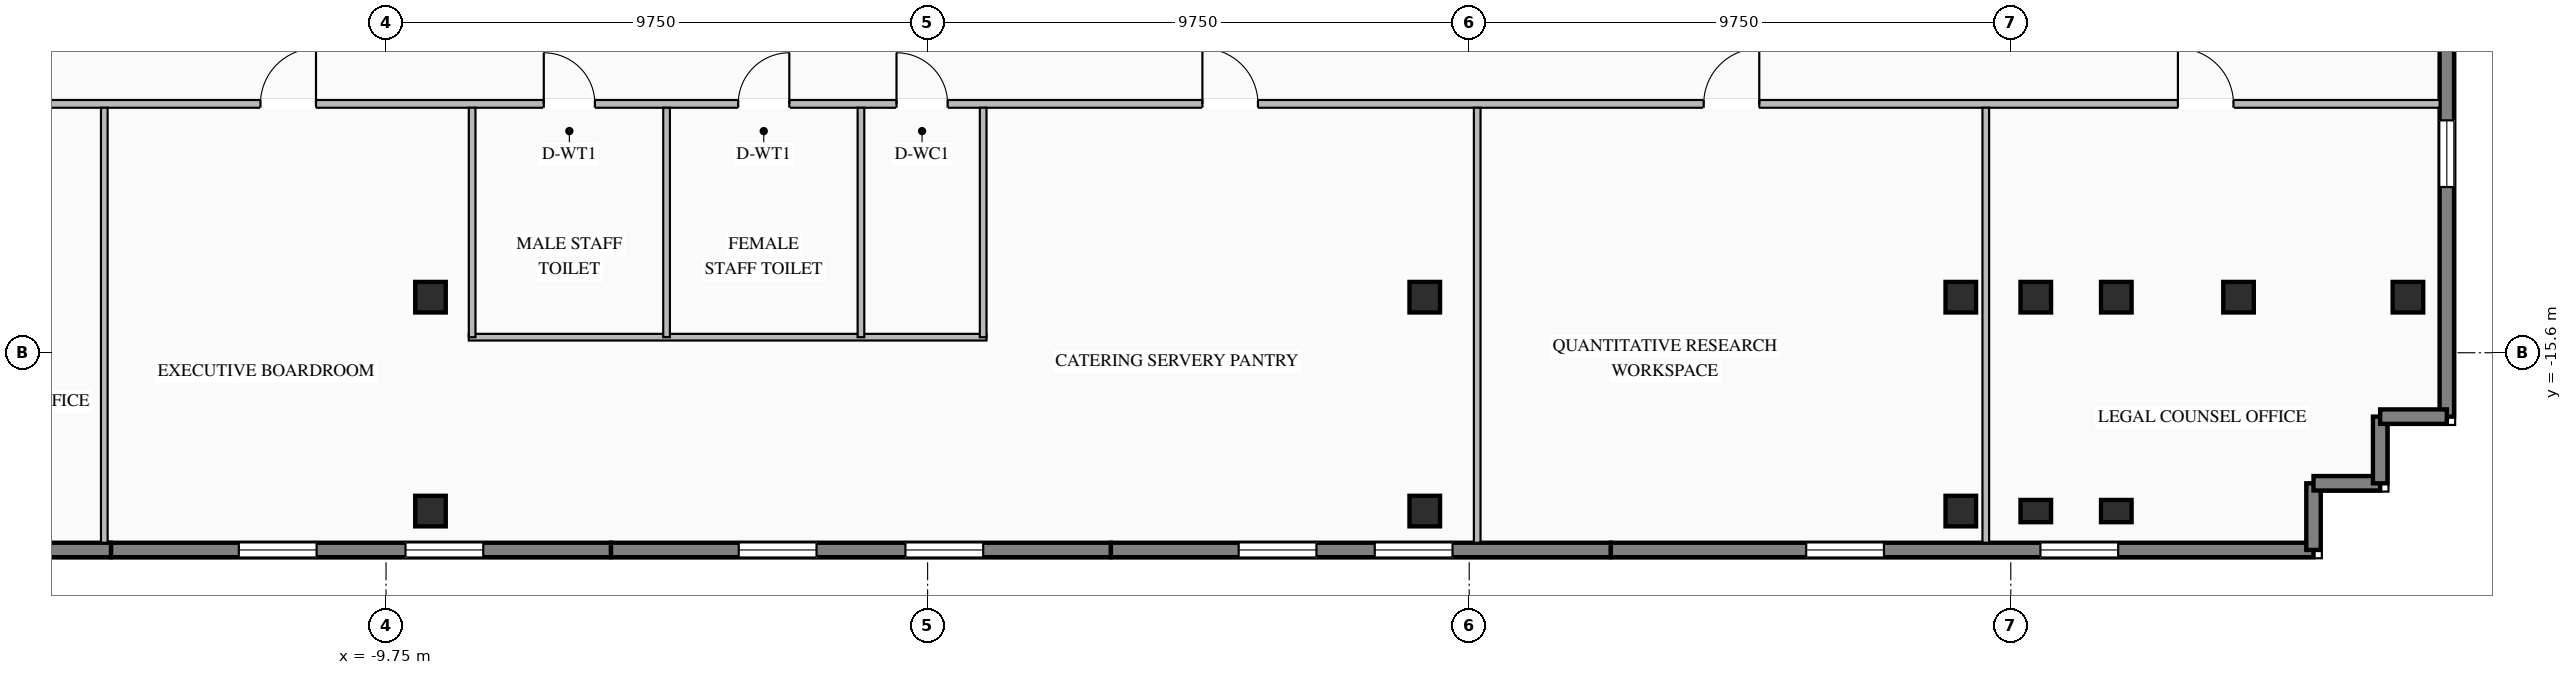
"""IFC4 building model, lengths in metres.
Left out: names, types, materials, properties, quantities, classifications, styles, units other than length and angle.
Written with IfcOpenShell. Run it as: python <this file> out.ifc"""

import sys

from ifc_helpers import new_model, si_unit, direction, frame, frame_2d, origin, origin_2d, place, context, subcontext, project, spatial, rectangle, i_section, extrude, element, fill, save


model = new_model("IFC4")
c1 = context("Model", 3, precision=1e-05, world=origin(), true_north=direction((0.0, 1.0)))
c2 = subcontext(c1, "Body", "Model", "MODEL_VIEW")
j1 = project(units=[si_unit("LENGTHUNIT", "METRE"), si_unit("PLANEANGLEUNIT", "RADIAN")], contexts=[c1])
p1 = place(None, origin())
s1 = spatial("IfcSite", under=j1, at=p1, CompositionType="ELEMENT")
p2 = place(p1, origin())
s2 = spatial("IfcBuilding", under=s1, at=p2, CompositionType="ELEMENT")
p3 = place(p2, frame((0.0, 0.0, 229.2)))
s3 = spatial("IfcBuildingStorey", under=s2, at=p3, CompositionType="ELEMENT", Elevation=229.2)
for number, where, z_axis, x_axis in (
    (1, (-8.95, -14.6, 0.0), (0.0, 0.0, 1.0), (1.0, 0.0, 0.0)),
    (2, (8.95, -14.6, 0.0), (0.0, 0.0, 1.0), (1.0, 0.0, 0.0)),
    (3, (18.6, -14.6, 0.0), (0.0, 0.0, 1.0), (1.0, 0.0, 0.0)),
    (4, (19.95, -14.6, 0.0), (0.0, 0.0, 1.0), (1.0, 0.0, 0.0)),
    (5, (21.4, -14.6, 0.0), (0.0, 0.0, 1.0), (1.0, 0.0, 0.0)),
    (6, (23.6, -14.6, 0.0), (0.0, 0.0, 1.0), (1.0, 0.0, 0.0)),
    (7, (-8.95, -18.45, 0.0), (0.0, 0.0, 1.0), (1.0, 0.0, 0.0)),
    (8, (8.95, -18.45, 0.0), (0.0, 0.0, 1.0), (1.0, 0.0, 0.0)),
    (9, (18.6, -18.45, 0.0), (0.0, 0.0, 1.0), (1.0, 0.0, 0.0)),
    (10, (26.65, -14.6, 0.0), (0.0, 0.0, 1.0), (1.0, 0.0, 0.0)),
):
    element("IfcColumn", number, at=place(p3, frame(where, z_axis=z_axis, x_axis=x_axis)), inside=s3, PredefinedType="COLUMN", context=c2, shape_type="SweptSolid", body=[
        extrude(i_section(OverallWidth=0.55, OverallDepth=0.55, WebThickness=0.024, FlangeThickness=0.036, at=origin_2d()), origin(), (0.0, 0.0, 1.0), 3.45),
    ])
for number, where, z_axis, x_axis in (
    (11, (19.95, -18.45, 0.0), (0.0, 0.0, 1.0), (1.0, 0.0, 0.0)),
    (12, (21.4, -18.45, 0.0), (0.0, 0.0, 1.0), (1.0, 0.0, 0.0)),
):
    element("IfcColumn", number, at=place(p3, frame(where, z_axis=z_axis, x_axis=x_axis)), inside=s3, PredefinedType="PILASTER", context=c2, shape_type="SweptSolid", body=[
        extrude(rectangle(XDim=0.55, YDim=0.4, at=origin_2d()), origin(), (0.0, 0.0, 1.0), 3.45),
    ])
p4 = place(p3, frame((-14.7, -19.15, 0.0), z_axis=(0.0, 0.0, 1.0), x_axis=(-1.0, 0.0, 0.0)))
e13 = element("IfcWall", 13, at=p4, inside=s3, PredefinedType="STANDARD", context=c2, shape_type="SweptSolid", body=[
    extrude(rectangle(XDim=12.65, YDim=0.26, at=frame_2d((6.325, 0.0))), origin(), (0.0, 0.0, 1.0), 3.25),
])
p5 = place(p4, frame((3.517, 0.0, 0.76)))
e14 = element("IfcOpeningElement", 14, at=p5, cuts=e13, PredefinedType="OPENING", context=c2, shape_type="SweptSolid", body=[
    extrude(rectangle(XDim=1.4, YDim=1.95, at=frame_2d((0.7, 0.975))), frame((0.0, 0.14, 0.0), z_axis=(0.0, -1.0, 0.0), x_axis=(1.0, 0.0, 0.0)), (0.0, 0.0, 1.0), 0.28),
])
p6 = place(p4, frame((8.283, 0.0, 0.76)))
e15 = element("IfcOpeningElement", 15, at=p6, cuts=e13, PredefinedType="OPENING", context=c2, shape_type="SweptSolid", body=[
    extrude(rectangle(XDim=1.4, YDim=1.95, at=frame_2d((0.7, 0.975))), frame((0.0, 0.14, 0.0), z_axis=(0.0, -1.0, 0.0), x_axis=(1.0, 0.0, 0.0)), (0.0, 0.0, 1.0), 0.28),
])
p7 = place(p3, frame((-5.7, -19.15, 0.0), z_axis=(0.0, 0.0, 1.0), x_axis=(-1.0, 0.0, 0.0)))
e16 = element("IfcWall", 16, at=p7, inside=s3, PredefinedType="STANDARD", context=c2, shape_type="SweptSolid", body=[
    extrude(rectangle(XDim=9.0, YDim=0.26, at=frame_2d((4.5, 0.0))), origin(), (0.0, 0.0, 1.0), 3.25),
])
p8 = place(p7, frame((2.3, 0.0, 0.76)))
e17 = element("IfcOpeningElement", 17, at=p8, cuts=e16, PredefinedType="OPENING", context=c2, shape_type="SweptSolid", body=[
    extrude(rectangle(XDim=1.4, YDim=1.95, at=frame_2d((0.7, 0.975))), frame((0.0, 0.14, 0.0), z_axis=(0.0, -1.0, 0.0), x_axis=(1.0, 0.0, 0.0)), (0.0, 0.0, 1.0), 0.28),
])
p9 = place(p7, frame((5.3, 0.0, 0.76)))
e18 = element("IfcOpeningElement", 18, at=p9, cuts=e16, PredefinedType="OPENING", context=c2, shape_type="SweptSolid", body=[
    extrude(rectangle(XDim=1.4, YDim=1.95, at=frame_2d((0.7, 0.975))), frame((0.0, 0.14, 0.0), z_axis=(0.0, -1.0, 0.0), x_axis=(1.0, 0.0, 0.0)), (0.0, 0.0, 1.0), 0.28),
])
p10 = place(p3, frame((3.3, -19.15, 0.0), z_axis=(0.0, 0.0, 1.0), x_axis=(-1.0, 0.0, 0.0)))
e19 = element("IfcWall", 19, at=p10, inside=s3, PredefinedType="STANDARD", context=c2, shape_type="SweptSolid", body=[
    extrude(rectangle(XDim=9.0, YDim=0.26, at=frame_2d((4.5, 0.0))), origin(), (0.0, 0.0, 1.0), 3.25),
])
p11 = place(p10, frame((2.3, 0.0, 0.76)))
e20 = element("IfcOpeningElement", 20, at=p11, cuts=e19, PredefinedType="OPENING", context=c2, shape_type="SweptSolid", body=[
    extrude(rectangle(XDim=1.4, YDim=1.95, at=frame_2d((0.7, 0.975))), frame((0.0, 0.14, 0.0), z_axis=(0.0, -1.0, 0.0), x_axis=(1.0, 0.0, 0.0)), (0.0, 0.0, 1.0), 0.28),
])
p12 = place(p10, frame((5.3, 0.0, 0.76)))
e21 = element("IfcOpeningElement", 21, at=p12, cuts=e19, PredefinedType="OPENING", context=c2, shape_type="SweptSolid", body=[
    extrude(rectangle(XDim=1.4, YDim=1.95, at=frame_2d((0.7, 0.975))), frame((0.0, 0.14, 0.0), z_axis=(0.0, -1.0, 0.0), x_axis=(1.0, 0.0, 0.0)), (0.0, 0.0, 1.0), 0.28),
])
p13 = place(p3, frame((12.3, -19.15, 0.0), z_axis=(0.0, 0.0, 1.0), x_axis=(-1.0, 0.0, 0.0)))
e22 = element("IfcWall", 22, at=p13, inside=s3, PredefinedType="STANDARD", context=c2, shape_type="SweptSolid", body=[
    extrude(rectangle(XDim=9.0, YDim=0.26, at=frame_2d((4.5, 0.0))), origin(), (0.0, 0.0, 1.0), 3.25),
])
p14 = place(p13, frame((2.85, 0.0, 0.76)))
e23 = element("IfcOpeningElement", 23, at=p14, cuts=e22, PredefinedType="OPENING", context=c2, shape_type="SweptSolid", body=[
    extrude(rectangle(XDim=1.4, YDim=1.95, at=frame_2d((0.7, 0.975))), frame((0.0, 0.14, 0.0), z_axis=(0.0, -1.0, 0.0), x_axis=(1.0, 0.0, 0.0)), (0.0, 0.0, 1.0), 0.28),
])
p15 = place(p13, frame((5.3, 0.0, 0.76)))
e24 = element("IfcOpeningElement", 24, at=p15, cuts=e22, PredefinedType="OPENING", context=c2, shape_type="SweptSolid", body=[
    extrude(rectangle(XDim=1.4, YDim=1.95, at=frame_2d((0.7, 0.975))), frame((0.0, 0.14, 0.0), z_axis=(0.0, -1.0, 0.0), x_axis=(1.0, 0.0, 0.0)), (0.0, 0.0, 1.0), 0.28),
])
p16 = place(p3, frame((24.95, -19.15, 0.0), z_axis=(0.0, 0.0, 1.0), x_axis=(-1.0, 0.0, 0.0)))
e25 = element("IfcWall", 25, at=p16, inside=s3, PredefinedType="STANDARD", context=c2, shape_type="SweptSolid", body=[
    extrude(rectangle(XDim=12.65, YDim=0.26, at=frame_2d((6.325, 0.0))), origin(), (0.0, 0.0, 1.0), 3.25),
])
p17 = place(p16, frame((3.517, 0.0, 0.76)))
e26 = element("IfcOpeningElement", 26, at=p17, cuts=e25, PredefinedType="OPENING", context=c2, shape_type="SweptSolid", body=[
    extrude(rectangle(XDim=1.4, YDim=1.95, at=frame_2d((0.7, 0.975))), frame((0.0, 0.14, 0.0), z_axis=(0.0, -1.0, 0.0), x_axis=(1.0, 0.0, 0.0)), (0.0, 0.0, 1.0), 0.28),
])
p18 = place(p16, frame((7.733, 0.0, 0.76)))
e27 = element("IfcOpeningElement", 27, at=p18, cuts=e25, PredefinedType="OPENING", context=c2, shape_type="SweptSolid", body=[
    extrude(rectangle(XDim=1.4, YDim=1.95, at=frame_2d((0.7, 0.975))), frame((0.0, 0.14, 0.0), z_axis=(0.0, -1.0, 0.0), x_axis=(1.0, 0.0, 0.0)), (0.0, 0.0, 1.0), 0.28),
])
p19 = place(p3, frame((27.35, -0.9, 0.0), z_axis=(0.0, 0.0, 1.0), x_axis=(0.0, -1.0, 0.0)))
e28 = element("IfcWall", 28, at=p19, inside=s3, PredefinedType="STANDARD", context=c2, shape_type="SweptSolid", body=[
    extrude(rectangle(XDim=15.85, YDim=0.26, at=frame_2d((7.925, 0.0))), origin(), (0.0, 0.0, 1.0), 3.25),
])
p20 = place(p19, frame((4.683, 0.0, 0.76)))
e29 = element("IfcOpeningElement", 29, at=p20, cuts=e28, PredefinedType="OPENING", context=c2, shape_type="SweptSolid", body=[
    extrude(rectangle(XDim=1.2, YDim=1.95, at=frame_2d((0.6, 0.975))), frame((0.0, 0.14, 0.0), z_axis=(0.0, -1.0, 0.0), x_axis=(1.0, 0.0, 0.0)), (0.0, 0.0, 1.0), 0.28),
])
p21 = place(p19, frame((10.517, 0.0, 0.76)))
e30 = element("IfcOpeningElement", 30, at=p21, cuts=e28, PredefinedType="OPENING", context=c2, shape_type="SweptSolid", body=[
    extrude(rectangle(XDim=1.2, YDim=1.95, at=frame_2d((0.6, 0.975))), frame((0.0, 0.14, 0.0), z_axis=(0.0, -1.0, 0.0), x_axis=(1.0, 0.0, 0.0)), (0.0, 0.0, 1.0), 0.28),
])
for number, where, z_axis, x_axis in (
    (31, (24.95, -19.15, 0.0), (0.0, 0.0, 1.0), (0.0, 1.0, 0.0)),
    (32, (24.95, -17.95, 0.0), (0.0, 0.0, 1.0), (1.0, 0.0, 0.0)),
    (33, (26.15, -17.95, 0.0), (0.0, 0.0, 1.0), (0.0, 1.0, 0.0)),
):
    element("IfcWall", number, at=place(p3, frame(where, z_axis=z_axis, x_axis=x_axis)), inside=s3, PredefinedType="STANDARD", context=c2, shape_type="SweptSolid", body=[
        extrude(rectangle(XDim=1.2, YDim=0.26, at=frame_2d((0.6, 0.0))), origin(), (0.0, 0.0, 1.0), 3.25),
    ])
p22 = place(p3, frame((26.15, -16.75, 0.0), z_axis=(0.0, 0.0, 1.0), x_axis=(1.0, 0.0, 0.0)))
e34 = element("IfcWall", 34, at=p22, inside=s3, PredefinedType="STANDARD", context=c2, shape_type="SweptSolid", body=[
    extrude(rectangle(XDim=1.2, YDim=0.26, at=frame_2d((0.6, 0.0))), origin(), (0.0, 0.0, 1.0), 3.25),
])
p23 = place(p3, frame((-29.62, -11.12, 0.0), z_axis=(0.0, 0.0, 1.0), x_axis=(1.0, 0.0, 0.0)))
e35 = element("IfcWall", 35, at=p23, inside=s3, PredefinedType="STANDARD", context=c2, shape_type="SweptSolid", body=[
    extrude(rectangle(XDim=56.84, YDim=0.14, at=frame_2d((28.42, 0.0))), origin(), (0.0, 0.0, 1.0), 3.25),
])
p24 = place(p23, frame((22.71, 0.0, 0.0)))
e36 = element("IfcOpeningElement", 36, at=p24, cuts=e35, PredefinedType="OPENING", context=c2, shape_type="SweptSolid", body=[
    extrude(rectangle(XDim=0.92, YDim=2.08, at=frame_2d((0.46, 1.04))), frame((0.0, 0.08, 0.0), z_axis=(0.0, -1.0, 0.0), x_axis=(1.0, 0.0, 0.0)), (0.0, 0.0, 1.0), 0.16),
])
p25 = place(p23, frame((26.21, 0.0, 0.0)))
e37 = element("IfcOpeningElement", 37, at=p25, cuts=e35, PredefinedType="OPENING", context=c2, shape_type="SweptSolid", body=[
    extrude(rectangle(XDim=0.92, YDim=2.08, at=frame_2d((0.46, 1.04))), frame((0.0, 0.08, 0.0), z_axis=(0.0, -1.0, 0.0), x_axis=(1.0, 0.0, 0.0)), (0.0, 0.0, 1.0), 0.16),
])
p26 = place(p23, frame((29.06, 0.0, 0.0)))
e38 = element("IfcOpeningElement", 38, at=p26, cuts=e35, PredefinedType="OPENING", context=c2, shape_type="SweptSolid", body=[
    extrude(rectangle(XDim=0.92, YDim=2.08, at=frame_2d((0.46, 1.04))), frame((0.0, 0.08, 0.0), z_axis=(0.0, -1.0, 0.0), x_axis=(1.0, 0.0, 0.0)), (0.0, 0.0, 1.0), 0.16),
])
p27 = place(p23, frame((3.287, 0.0, 0.0)))
e39 = element("IfcOpeningElement", 39, at=p27, cuts=e35, PredefinedType="OPENING", context=c2, shape_type="SweptSolid", body=[
    extrude(rectangle(XDim=1.0, YDim=2.08, at=frame_2d((0.5, 1.04))), frame((0.0, 0.08, 0.0), z_axis=(0.0, -1.0, 0.0), x_axis=(1.0, 0.0, 0.0)), (0.0, 0.0, 1.0), 0.16),
])
p28 = place(p23, frame((10.56, 0.0, 0.0)))
e40 = element("IfcOpeningElement", 40, at=p28, cuts=e35, PredefinedType="OPENING", context=c2, shape_type="SweptSolid", body=[
    extrude(rectangle(XDim=1.0, YDim=2.08, at=frame_2d((0.5, 1.04))), frame((0.0, 0.08, 0.0), z_axis=(0.0, -1.0, 0.0), x_axis=(1.0, 0.0, 0.0)), (0.0, 0.0, 1.0), 0.16),
])
p29 = place(p23, frame((17.609, 0.0, 0.0)))
e41 = element("IfcOpeningElement", 41, at=p29, cuts=e35, PredefinedType="OPENING", context=c2, shape_type="SweptSolid", body=[
    extrude(rectangle(XDim=1.0, YDim=2.08, at=frame_2d((0.5, 1.04))), frame((0.0, 0.08, 0.0), z_axis=(0.0, -1.0, 0.0), x_axis=(1.0, 0.0, 0.0)), (0.0, 0.0, 1.0), 0.16),
])
p30 = place(p23, frame((34.567, 0.0, 0.0)))
e42 = element("IfcOpeningElement", 42, at=p30, cuts=e35, PredefinedType="OPENING", context=c2, shape_type="SweptSolid", body=[
    extrude(rectangle(XDim=1.0, YDim=2.08, at=frame_2d((0.5, 1.04))), frame((0.0, 0.08, 0.0), z_axis=(0.0, -1.0, 0.0), x_axis=(1.0, 0.0, 0.0)), (0.0, 0.0, 1.0), 0.16),
])
p31 = place(p23, frame((43.592, 0.0, 0.0)))
e43 = element("IfcOpeningElement", 43, at=p31, cuts=e35, PredefinedType="OPENING", context=c2, shape_type="SweptSolid", body=[
    extrude(rectangle(XDim=1.0, YDim=2.08, at=frame_2d((0.5, 1.04))), frame((0.0, 0.08, 0.0), z_axis=(0.0, -1.0, 0.0), x_axis=(1.0, 0.0, 0.0)), (0.0, 0.0, 1.0), 0.16),
])
p32 = place(p23, frame((52.129, 0.0, 0.0)))
e44 = element("IfcOpeningElement", 44, at=p32, cuts=e35, PredefinedType="OPENING", context=c2, shape_type="SweptSolid", body=[
    extrude(rectangle(XDim=1.0, YDim=2.08, at=frame_2d((0.5, 1.04))), frame((0.0, 0.08, 0.0), z_axis=(0.0, -1.0, 0.0), x_axis=(1.0, 0.0, 0.0)), (0.0, 0.0, 1.0), 0.16),
])
p33 = place(p3, frame((-8.26, -15.32, 0.0), z_axis=(0.0, 0.0, 1.0), x_axis=(1.0, 0.0, 0.0)))
e45 = element("IfcWall", 45, at=p33, inside=s3, PredefinedType="STANDARD", context=c2, shape_type="SweptSolid", body=[
    extrude(rectangle(XDim=9.32, YDim=0.12, at=frame_2d((4.66, 0.0))), origin(), (0.0, 0.0, 1.0), 3.25),
])
for number, where, z_axis, x_axis in (
    (46, (-8.2, -15.32, 0.0), (0.0, 0.0, 1.0), (0.0, 1.0, 0.0)),
    (47, (-4.7, -15.32, 0.0), (0.0, 0.0, 1.0), (0.0, 1.0, 0.0)),
    (48, (-1.2, -15.32, 0.0), (0.0, 0.0, 1.0), (0.0, 1.0, 0.0)),
    (49, (1.0, -15.32, 0.0), (0.0, 0.0, 1.0), (0.0, 1.0, 0.0)),
):
    element("IfcWall", number, at=place(p3, frame(where, z_axis=z_axis, x_axis=x_axis)), inside=s3, PredefinedType="STANDARD", context=c2, shape_type="SweptSolid", body=[
        extrude(rectangle(XDim=4.13, YDim=0.12, at=frame_2d((2.065, 0.0))), origin(), (0.0, 0.0, 1.0), 3.25),
    ])
for number, where, z_axis, x_axis in (
    (50, (-14.822, -19.02, 0.0), (0.0, 0.0, 1.0), (0.0, 1.0, 0.0)),
    (51, (9.894, -19.02, 0.0), (0.0, 0.0, 1.0), (0.0, 1.0, 0.0)),
    (52, (19.05, -19.02, 0.0), (0.0, 0.0, 1.0), (0.0, 1.0, 0.0)),
):
    element("IfcWall", number, at=place(p3, frame(where, z_axis=z_axis, x_axis=x_axis)), inside=s3, PredefinedType="STANDARD", context=c2, shape_type="SweptSolid", body=[
        extrude(rectangle(XDim=7.83, YDim=0.12, at=frame_2d((3.915, 0.0))), origin(), (0.0, 0.0, 1.0), 3.25),
    ])
p34 = place(p8, origin())
e53 = element("IfcWindow", 53, at=p34, inside=s3, PartitioningType="SINGLE_PANEL", PredefinedType="WINDOW", context=c2, shape_type="SweptSolid", body=[
    extrude(rectangle(XDim=1.4, YDim=1.95, at=frame_2d((0.7, 0.975))), frame((0.0, 0.03, 0.0), z_axis=(0.0, -1.0, 0.0), x_axis=(1.0, 0.0, 0.0)), (0.0, 0.0, 1.0), 0.06),
])
fill(e17, e53)
p35 = place(p9, origin())
e54 = element("IfcWindow", 54, at=p35, inside=s3, PartitioningType="SINGLE_PANEL", PredefinedType="WINDOW", context=c2, shape_type="SweptSolid", body=[
    extrude(rectangle(XDim=1.4, YDim=1.95, at=frame_2d((0.7, 0.975))), frame((0.0, 0.03, 0.0), z_axis=(0.0, -1.0, 0.0), x_axis=(1.0, 0.0, 0.0)), (0.0, 0.0, 1.0), 0.06),
])
fill(e18, e54)
p36 = place(p11, origin())
e55 = element("IfcWindow", 55, at=p36, inside=s3, PartitioningType="SINGLE_PANEL", PredefinedType="WINDOW", context=c2, shape_type="SweptSolid", body=[
    extrude(rectangle(XDim=1.4, YDim=1.95, at=frame_2d((0.7, 0.975))), frame((0.0, 0.03, 0.0), z_axis=(0.0, -1.0, 0.0), x_axis=(1.0, 0.0, 0.0)), (0.0, 0.0, 1.0), 0.06),
])
fill(e20, e55)
p37 = place(p12, origin())
e56 = element("IfcWindow", 56, at=p37, inside=s3, PartitioningType="SINGLE_PANEL", PredefinedType="WINDOW", context=c2, shape_type="SweptSolid", body=[
    extrude(rectangle(XDim=1.4, YDim=1.95, at=frame_2d((0.7, 0.975))), frame((0.0, 0.03, 0.0), z_axis=(0.0, -1.0, 0.0), x_axis=(1.0, 0.0, 0.0)), (0.0, 0.0, 1.0), 0.06),
])
fill(e21, e56)
p38 = place(p14, origin())
e57 = element("IfcWindow", 57, at=p38, inside=s3, PartitioningType="SINGLE_PANEL", PredefinedType="WINDOW", context=c2, shape_type="SweptSolid", body=[
    extrude(rectangle(XDim=1.4, YDim=1.95, at=frame_2d((0.7, 0.975))), frame((0.0, 0.03, 0.0), z_axis=(0.0, -1.0, 0.0), x_axis=(1.0, 0.0, 0.0)), (0.0, 0.0, 1.0), 0.06),
])
fill(e23, e57)
p39 = place(p15, origin())
e58 = element("IfcWindow", 58, at=p39, inside=s3, PartitioningType="SINGLE_PANEL", PredefinedType="WINDOW", context=c2, shape_type="SweptSolid", body=[
    extrude(rectangle(XDim=1.4, YDim=1.95, at=frame_2d((0.7, 0.975))), frame((0.0, 0.03, 0.0), z_axis=(0.0, -1.0, 0.0), x_axis=(1.0, 0.0, 0.0)), (0.0, 0.0, 1.0), 0.06),
])
fill(e24, e58)
p40 = place(p17, origin())
e59 = element("IfcWindow", 59, at=p40, inside=s3, PartitioningType="SINGLE_PANEL", PredefinedType="WINDOW", context=c2, shape_type="SweptSolid", body=[
    extrude(rectangle(XDim=1.4, YDim=1.95, at=frame_2d((0.7, 0.975))), frame((0.0, 0.03, 0.0), z_axis=(0.0, -1.0, 0.0), x_axis=(1.0, 0.0, 0.0)), (0.0, 0.0, 1.0), 0.06),
])
fill(e26, e59)
p41 = place(p18, origin())
e60 = element("IfcWindow", 60, at=p41, inside=s3, PartitioningType="SINGLE_PANEL", PredefinedType="WINDOW", context=c2, shape_type="SweptSolid", body=[
    extrude(rectangle(XDim=1.4, YDim=1.95, at=frame_2d((0.7, 0.975))), frame((0.0, 0.03, 0.0), z_axis=(0.0, -1.0, 0.0), x_axis=(1.0, 0.0, 0.0)), (0.0, 0.0, 1.0), 0.06),
])
fill(e27, e60)
p42 = place(p21, origin())
e61 = element("IfcWindow", 61, at=p42, inside=s3, PartitioningType="SINGLE_PANEL", PredefinedType="WINDOW", context=c2, shape_type="SweptSolid", body=[
    extrude(rectangle(XDim=1.2, YDim=1.95, at=frame_2d((0.6, 0.975))), frame((0.0, 0.03, 0.0), z_axis=(0.0, -1.0, 0.0), x_axis=(1.0, 0.0, 0.0)), (0.0, 0.0, 1.0), 0.06),
])
fill(e30, e61)
p43 = place(p24, origin())
e62 = element("IfcDoor", 62, at=p43, inside=s3, OperationType="SINGLE_SWING_LEFT", PredefinedType="DOOR", context=c2, shape_type="SweptSolid", body=[
    extrude(rectangle(XDim=0.92, YDim=2.08, at=frame_2d((0.46, 1.04))), frame((0.0, 0.025, 0.0), z_axis=(0.0, -1.0, 0.0), x_axis=(1.0, 0.0, 0.0)), (0.0, 0.0, 1.0), 0.05),
])
fill(e36, e62)
p44 = place(p25, origin())
e63 = element("IfcDoor", 63, at=p44, inside=s3, OperationType="SINGLE_SWING_RIGHT", PredefinedType="DOOR", context=c2, shape_type="SweptSolid", body=[
    extrude(rectangle(XDim=0.92, YDim=2.08, at=frame_2d((0.46, 1.04))), frame((0.0, 0.025, 0.0), z_axis=(0.0, -1.0, 0.0), x_axis=(1.0, 0.0, 0.0)), (0.0, 0.0, 1.0), 0.05),
])
fill(e37, e63)
p45 = place(p26, origin())
e64 = element("IfcDoor", 64, at=p45, inside=s3, OperationType="SINGLE_SWING_LEFT", PredefinedType="DOOR", context=c2, shape_type="SweptSolid", body=[
    extrude(rectangle(XDim=0.92, YDim=2.08, at=frame_2d((0.46, 1.04))), frame((0.0, 0.025, 0.0), z_axis=(0.0, -1.0, 0.0), x_axis=(1.0, 0.0, 0.0)), (0.0, 0.0, 1.0), 0.05),
])
fill(e38, e64)
p46 = place(p29, origin())
e65 = element("IfcDoor", 65, at=p46, inside=s3, OperationType="SINGLE_SWING_RIGHT", PredefinedType="DOOR", context=c2, shape_type="SweptSolid", body=[
    extrude(rectangle(XDim=1.0, YDim=2.08, at=frame_2d((0.5, 1.04))), frame((0.0, 0.025, 0.0), z_axis=(0.0, -1.0, 0.0), x_axis=(1.0, 0.0, 0.0)), (0.0, 0.0, 1.0), 0.05),
])
fill(e41, e65)
p47 = place(p30, origin())
e66 = element("IfcDoor", 66, at=p47, inside=s3, OperationType="SINGLE_SWING_LEFT", PredefinedType="DOOR", context=c2, shape_type="SweptSolid", body=[
    extrude(rectangle(XDim=1.0, YDim=2.08, at=frame_2d((0.5, 1.04))), frame((0.0, 0.025, 0.0), z_axis=(0.0, -1.0, 0.0), x_axis=(1.0, 0.0, 0.0)), (0.0, 0.0, 1.0), 0.05),
])
fill(e42, e66)
p48 = place(p31, origin())
e67 = element("IfcDoor", 67, at=p48, inside=s3, OperationType="SINGLE_SWING_RIGHT", PredefinedType="DOOR", context=c2, shape_type="SweptSolid", body=[
    extrude(rectangle(XDim=1.0, YDim=2.08, at=frame_2d((0.5, 1.04))), frame((0.0, 0.025, 0.0), z_axis=(0.0, -1.0, 0.0), x_axis=(1.0, 0.0, 0.0)), (0.0, 0.0, 1.0), 0.05),
])
fill(e43, e67)
p49 = place(p32, origin())
e68 = element("IfcDoor", 68, at=p49, inside=s3, OperationType="SINGLE_SWING_LEFT", PredefinedType="DOOR", context=c2, shape_type="SweptSolid", body=[
    extrude(rectangle(XDim=1.0, YDim=2.08, at=frame_2d((0.5, 1.04))), frame((0.0, 0.025, 0.0), z_axis=(0.0, -1.0, 0.0), x_axis=(1.0, 0.0, 0.0)), (0.0, 0.0, 1.0), 0.05),
])
fill(e44, e68)
save(model, sys.argv[1])
